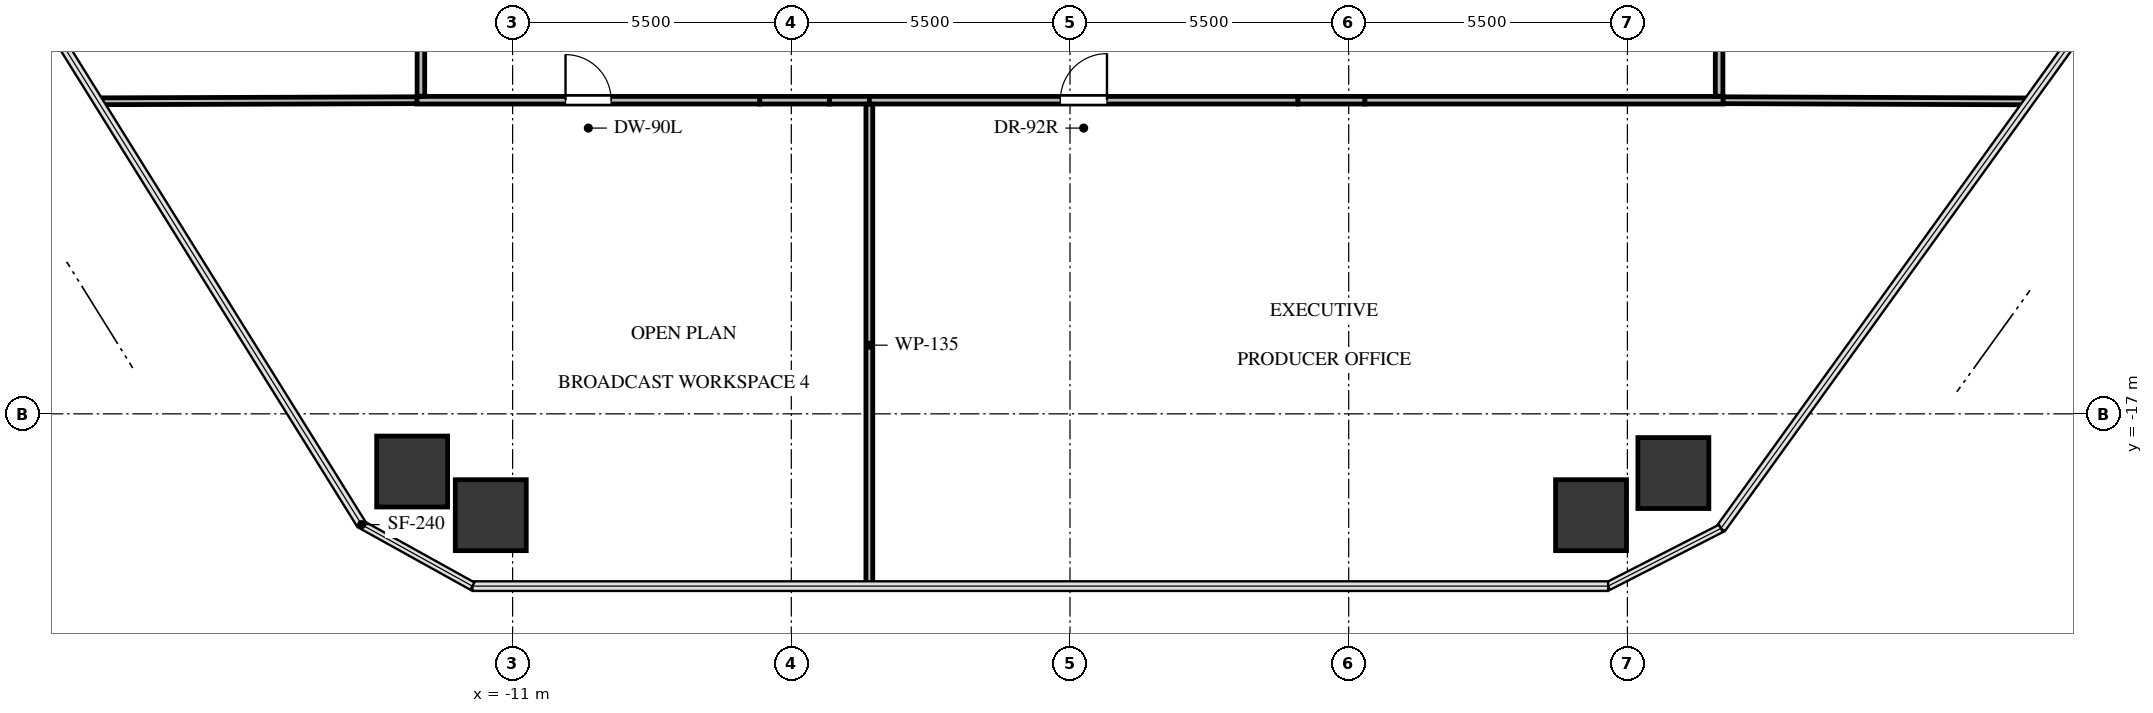
"""IFC4 building model, lengths in metres.
Left out: names, types, materials, properties, quantities, classifications, styles, units other than length and angle.
Written with IfcOpenShell. Run it as: python <this file> out.ifc"""

import sys

from ifc_helpers import new_model, si_unit, direction, frame, frame_2d, origin, origin_2d, place, context, subcontext, project, spatial, rectangle, extrude, source, transform, mapped, element, fill, save


model = new_model("IFC4")
c1 = context("Model", 3, precision=1e-05, world=origin(), true_north=direction((0.0, 1.0)))
c2 = subcontext(c1, "Body", "Model", "MODEL_VIEW")
j1 = project(units=[si_unit("LENGTHUNIT", "METRE"), si_unit("PLANEANGLEUNIT", "RADIAN")], contexts=[c1])
p1 = place(None, origin())
s1 = spatial("IfcSite", under=j1, at=p1, CompositionType="ELEMENT")
p2 = place(p1, origin())
s2 = spatial("IfcBuilding", under=s1, at=p2, CompositionType="ELEMENT")
p3 = place(p2, frame((0.0, 0.0, 35.7)))
s3 = spatial("IfcBuildingStorey", under=s2, at=p3, CompositionType="ELEMENT", Elevation=35.7)
m1 = source(origin(), c2, "Body", "SweptSolid", [
    extrude(rectangle(XDim=1.4, YDim=1.4, at=origin_2d()), origin(), (0.0, 0.0, 1.0), 3.3),
])
for number, where, z_axis, x_axis in (
    (1, (-12.983, -18.138, -0.24), (0.0, 0.0, 1.0), (1.0, 0.0, 0.0)),
    (2, (11.907, -18.168, -0.24), (0.0, 0.0, 1.0), (1.0, 0.0, 0.0)),
    (3, (10.283, -19.0, -0.24), (0.0, 0.0, 1.0), (1.0, 0.0, 0.0)),
    (4, (-11.431, -19.0, -0.24), (0.0, 0.0, 1.0), (1.0, 0.0, 0.0)),
):
    element("IfcColumn", number, at=place(p3, frame(where, z_axis=z_axis, x_axis=x_axis)), inside=s3, PredefinedType="COLUMN", context=c2, shape_type="MappedRepresentation", body=[
        mapped(m1, transform((0.0, 0.0, 0.0), x_axis=(1.0, 0.0, 0.0), y_axis=(0.0, 1.0, 0.0), z_axis=(0.0, 0.0, 1.0), scale=1.0)),
    ])
p4 = place(p3, frame((-12.89, -10.81, 0.0), z_axis=(0.0, 0.0, 1.0), x_axis=(1.0, 0.0, 0.0)))
e5 = element("IfcWall", 5, at=p4, inside=s3, PredefinedType="PARTITIONING", context=c2, shape_type="SweptSolid", body=[
    extrude(rectangle(XDim=6.768, YDim=0.15, at=frame_2d((3.384, 0.0))), origin(), (0.0, 0.0, 1.0), 2.13),
])
p5 = place(p4, frame((2.934, 0.0, 0.0)))
e6 = element("IfcOpeningElement", 6, at=p5, cuts=e5, PredefinedType="OPENING", context=c2, shape_type="SweptSolid", body=[
    extrude(rectangle(XDim=0.9, YDim=2.05, at=frame_2d((0.45, 1.025))), frame((0.0, 0.085, 0.0), z_axis=(0.0, -1.0, 0.0), x_axis=(1.0, 0.0, 0.0)), (0.0, 0.0, 1.0), 0.17),
])
p6 = place(p3, frame((-4.75, -10.81, 0.0), z_axis=(0.0, 0.0, 1.0), x_axis=(1.0, 0.0, 0.0)))
e7 = element("IfcWall", 7, at=p6, inside=s3, PredefinedType="PARTITIONING", context=c2, shape_type="SweptSolid", body=[
    extrude(rectangle(XDim=0.79, YDim=0.15, at=frame_2d((0.395, 0.0))), origin(), (0.0, 0.0, 1.0), 3.045),
])
p7 = place(p3, frame((-6.122, -10.81, 0.0), z_axis=(0.0, 0.0, 1.0), x_axis=(1.0, 0.0, 0.0)))
e8 = element("IfcWall", 8, at=p7, inside=s3, PredefinedType="PARTITIONING", context=c2, shape_type="SweptSolid", body=[
    extrude(rectangle(XDim=1.372, YDim=0.15, at=frame_2d((0.686, 0.0))), origin(), (0.0, 0.0, 1.0), 2.13),
])
p8 = place(p3, frame((-3.96, -10.81, 0.0), z_axis=(0.0, 0.0, 1.0), x_axis=(1.0, 0.0, 0.0)))
e9 = element("IfcWall", 9, at=p8, inside=s3, PredefinedType="PARTITIONING", context=c2, shape_type="SweptSolid", body=[
    extrude(rectangle(XDim=8.459, YDim=0.15, at=frame_2d((4.229, 0.0))), origin(), (0.0, 0.0, 1.0), 3.045),
])
p9 = place(p8, frame((3.77, 0.0, 0.0)))
e10 = element("IfcOpeningElement", 10, at=p9, cuts=e9, PredefinedType="OPENING", context=c2, shape_type="SweptSolid", body=[
    extrude(rectangle(XDim=0.92, YDim=2.1, at=frame_2d((0.46, 1.05))), frame((0.0, 0.085, 0.0), z_axis=(0.0, -1.0, 0.0), x_axis=(1.0, 0.0, 0.0)), (0.0, 0.0, 1.0), 0.17),
])
p10 = place(p3, frame((5.817, -10.81, 0.0), z_axis=(0.0, 0.0, 1.0), x_axis=(1.0, 0.0, 0.0)))
e11 = element("IfcWall", 11, at=p10, inside=s3, PredefinedType="PARTITIONING", context=c2, shape_type="SweptSolid", body=[
    extrude(rectangle(XDim=7.073, YDim=0.15, at=frame_2d((3.536, 0.0))), origin(), (0.0, 0.0, 1.0), 2.13),
])
p11 = place(p3, frame((4.499, -10.81, 0.0), z_axis=(0.0, 0.0, 1.0), x_axis=(1.0, 0.0, 0.0)))
e12 = element("IfcWall", 12, at=p11, inside=s3, PredefinedType="PARTITIONING", context=c2, shape_type="SweptSolid", body=[
    extrude(rectangle(XDim=1.318, YDim=0.15, at=frame_2d((0.659, 0.0))), origin(), (0.0, 0.0, 1.0), 2.13),
])
p12 = place(p3, frame((-12.81, 1.682, 0.0), z_axis=(0.0, 0.0, 1.0), x_axis=(0.0, -1.0, 0.0)))
e13 = element("IfcWall", 13, at=p12, inside=s3, PredefinedType="PARTITIONING", context=c2, shape_type="SweptSolid", body=[
    extrude(rectangle(XDim=12.413, YDim=0.15, at=frame_2d((6.207, 0.0))), origin(), (0.0, 0.0, 1.0), 3.045),
])
p13 = place(p12, frame((5.732, 0.0, 0.0)))
e14 = element("IfcOpeningElement", 14, at=p13, cuts=e13, PredefinedType="OPENING", context=c2, shape_type="SweptSolid", body=[
    extrude(rectangle(XDim=0.95, YDim=2.1, at=frame_2d((0.475, 1.05))), frame((0.0, 0.085, 0.0), z_axis=(0.0, -1.0, 0.0), x_axis=(1.0, 0.0, 0.0)), (0.0, 0.0, 1.0), 0.17),
])
p14 = place(p3, frame((12.81, -10.731, 0.0), z_axis=(0.0, 0.0, 1.0), x_axis=(0.0, 1.0, 0.0)))
e15 = element("IfcWall", 15, at=p14, inside=s3, PredefinedType="PARTITIONING", context=c2, shape_type="SweptSolid", body=[
    extrude(rectangle(XDim=2.291, YDim=0.15, at=frame_2d((1.146, 0.0))), origin(), (0.0, 0.0, 1.0), 3.045),
])
p15 = place(p3, frame((-3.96, -10.889, 0.0), z_axis=(0.0, 0.0, 1.0), x_axis=(0.0, -1.0, 0.0)))
e16 = element("IfcWall", 16, at=p15, inside=s3, PredefinedType="PARTITIONING", context=c2, shape_type="SweptSolid", body=[
    extrude(rectangle(XDim=9.511, YDim=0.135, at=frame_2d((4.755, 0.0))), origin(), (0.0, 0.0, 1.0), 2.38),
])
p16 = place(p3, frame((-19.182, -10.831, 0.0), z_axis=(0.0, 0.0, 1.0), x_axis=(0.999994432845, 0.003336806783, 0.0)))
e17 = element("IfcWall", 17, at=p16, inside=s3, PredefinedType="PARTITIONING", context=c2, shape_type="SweptSolid", body=[
    extrude(rectangle(XDim=6.292, YDim=0.135, at=frame_2d((3.146, 0.0))), origin(), (0.0, 0.0, 1.0), 2.38),
])
p17 = place(p3, frame((12.89, -10.81, 0.0), z_axis=(0.0, 0.0, 1.0), x_axis=(0.999992607823, -0.003845035728, 0.0)))
e18 = element("IfcWall", 18, at=p17, inside=s3, PredefinedType="PARTITIONING", context=c2, shape_type="SweptSolid", body=[
    extrude(rectangle(XDim=6.032, YDim=0.135, at=frame_2d((3.016, 0.0))), origin(), (0.0, 0.0, 1.0), 2.38),
])
m2 = source(origin(), c2, "Body", "SweptSolid", [
    extrude(rectangle(XDim=0.9, YDim=2.05, at=frame_2d((0.45, 1.025))), frame((0.0, 0.025, 0.0), z_axis=(0.0, -1.0, 0.0), x_axis=(1.0, 0.0, 0.0)), (0.0, 0.0, 1.0), 0.05),
])
p18 = place(p5, origin())
e19 = element("IfcDoor", 19, at=p18, inside=s3, OperationType="SINGLE_SWING_LEFT", PredefinedType="DOOR", context=c2, shape_type="MappedRepresentation", body=[
    mapped(m2, transform((0.0, 0.0, 0.0), x_axis=(1.0, 0.0, 0.0), y_axis=(0.0, 1.0, 0.0), z_axis=(0.0, 0.0, 1.0), scale=1.0)),
])
fill(e6, e19)
m3 = source(origin(), c2, "Body", "SweptSolid", [
    extrude(rectangle(XDim=0.92, YDim=2.1, at=frame_2d((0.46, 1.05))), frame((0.0, 0.025, 0.0), z_axis=(0.0, -1.0, 0.0), x_axis=(1.0, 0.0, 0.0)), (0.0, 0.0, 1.0), 0.05),
])
p19 = place(p9, origin())
e20 = element("IfcDoor", 20, at=p19, inside=s3, OperationType="SINGLE_SWING_RIGHT", PredefinedType="DOOR", context=c2, shape_type="MappedRepresentation", body=[
    mapped(m3, transform((0.0, 0.0, 0.0), x_axis=(1.0, 0.0, 0.0), y_axis=(0.0, 1.0, 0.0), z_axis=(0.0, 0.0, 1.0), scale=1.0)),
])
fill(e10, e20)
save(model, sys.argv[1])
